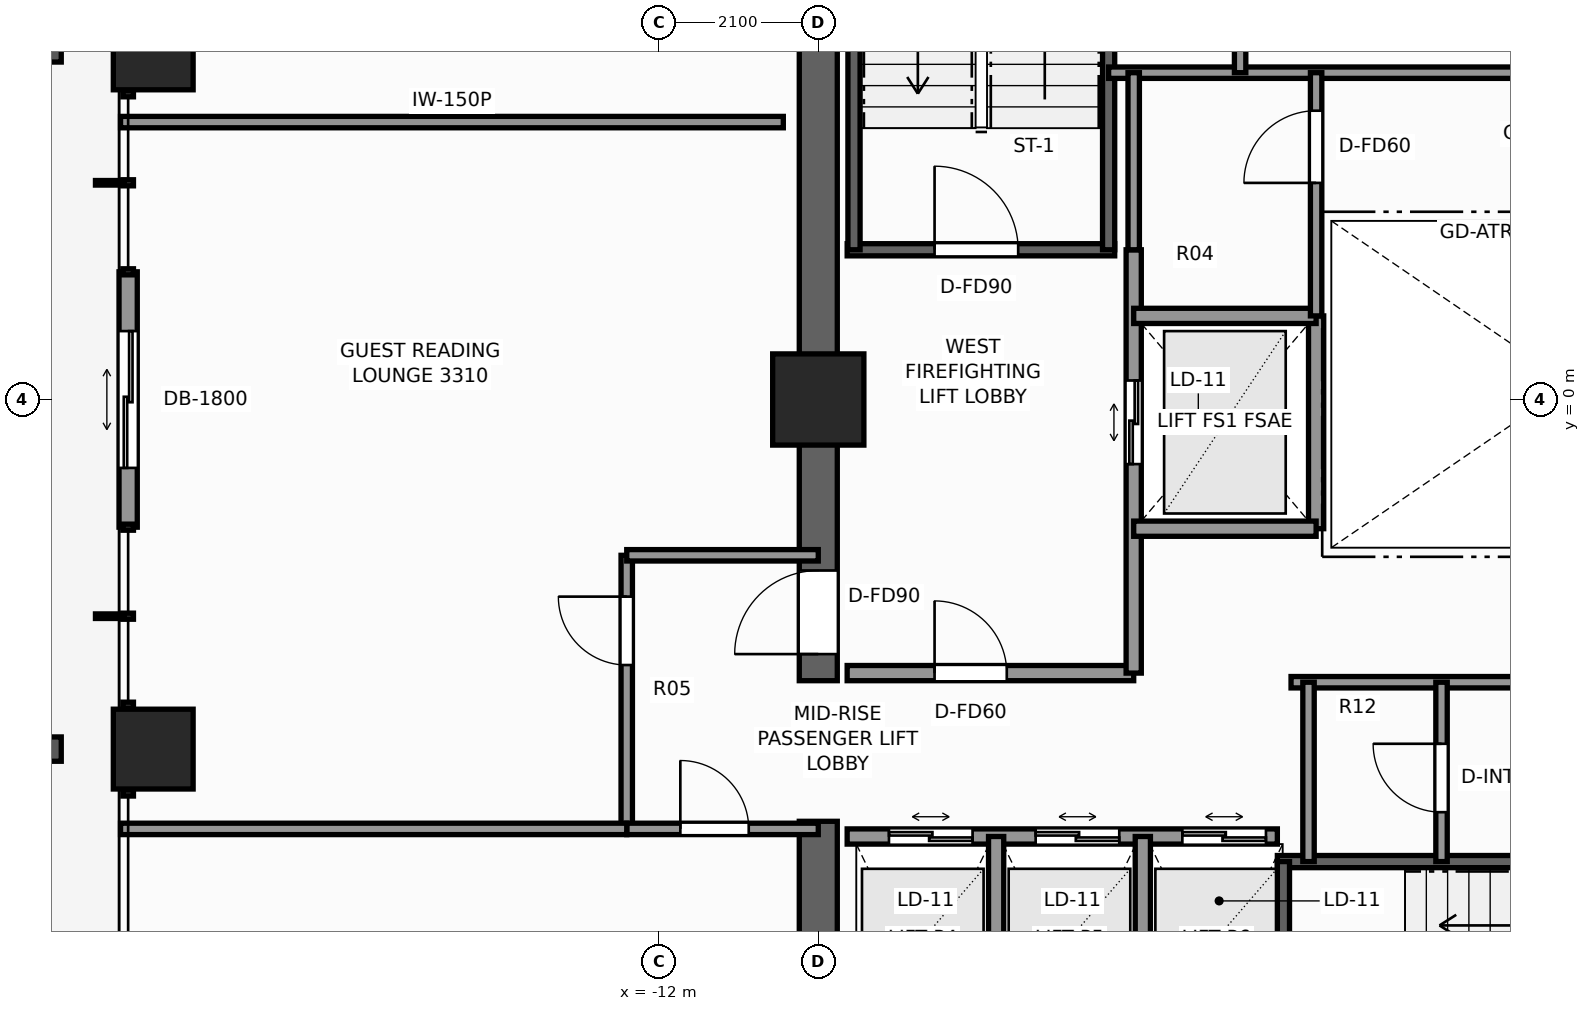
"""IFC4 building model, lengths in metres.
Left out: names, types, materials, properties, quantities, classifications, styles, units other than length and angle.
Written with IfcOpenShell. Run it as: python <this file> out.ifc"""

import sys

from ifc_helpers import new_model, si_unit, direction, frame, frame_2d, origin, origin_2d, place, context, subcontext, project, spatial, rectangle, extrude, element, fill, save


model = new_model("IFC4")
c1 = context("Model", 3, precision=1e-05, world=origin(), true_north=direction((0.0, 1.0)))
c2 = subcontext(c1, "Body", "Model", "MODEL_VIEW")
j1 = project(units=[si_unit("LENGTHUNIT", "METRE"), si_unit("PLANEANGLEUNIT", "RADIAN")], contexts=[c1])
p1 = place(None, origin())
s1 = spatial("IfcSite", under=j1, at=p1, CompositionType="ELEMENT")
p2 = place(p1, origin())
s2 = spatial("IfcBuilding", under=s1, at=p2, CompositionType="ELEMENT")
p3 = place(p2, frame((0.0, 0.0, 115.1)))
s3 = spatial("IfcBuildingStorey", under=s2, at=p3, CompositionType="ELEMENT", Elevation=115.1)
p4 = place(p3, frame((-9.9, -9.65, 0.0), z_axis=(0.0, 0.0, 1.0), x_axis=(0.0, 1.0, 0.0)))
e1 = element("IfcWall", 1, at=p4, inside=s3, PredefinedType="SHEAR", context=c2, shape_type="SweptSolid", body=[
    extrude(rectangle(XDim=4.1, YDim=0.5, at=frame_2d((2.05, 0.0))), origin(), (0.0, 0.0, 1.0), 3.3),
])
p5 = place(p3, frame((-9.9, -3.7, 0.0), z_axis=(0.0, 0.0, 1.0), x_axis=(0.0, 1.0, 0.0)))
e2 = element("IfcWall", 2, at=p5, inside=s3, PredefinedType="SHEAR", context=c2, shape_type="SweptSolid", body=[
    extrude(rectangle(XDim=13.35, YDim=0.5, at=frame_2d((6.675, 0.0))), origin(), (0.0, 0.0, 1.0), 3.3),
])
p6 = place(p5, frame((0.35, 0.0, 0.0)))
e3 = element("IfcOpeningElement", 3, at=p6, cuts=e2, PredefinedType="OPENING", context=c2, shape_type="SweptSolid", body=[
    extrude(rectangle(XDim=1.1, YDim=2.2, at=frame_2d((0.55, 1.1))), frame((0.0, 0.26, 0.0), z_axis=(0.0, -1.0, 0.0), x_axis=(1.0, 0.0, 0.0)), (0.0, 0.0, 1.0), 0.52),
])
p7 = place(p3, frame((-9.9, 0.0, 0.0), z_axis=(0.0, 0.0, 1.0), x_axis=(1.0, 0.0, 0.0)))
e4 = element("IfcColumn", 4, at=p7, inside=s3, PredefinedType="COLUMN", context=c2, shape_type="SweptSolid", body=[
    extrude(rectangle(XDim=1.2, YDim=1.2, at=origin_2d()), origin(), (0.0, 0.0, 1.0), 3.3),
])
for number, where, z_axis, x_axis in (
    (5, (-18.65, -4.6, 0.0), (0.0, 0.0, 1.0), (1.0, 0.0, 0.0)),
    (6, (-18.65, 4.6, 0.0), (0.0, 0.0, 1.0), (1.0, 0.0, 0.0)),
):
    element("IfcColumn", number, at=place(p3, frame(where, z_axis=z_axis, x_axis=x_axis)), inside=s3, PredefinedType="COLUMN", context=c2, shape_type="SweptSolid", body=[
        extrude(rectangle(XDim=1.05, YDim=1.05, at=origin_2d()), origin(), (0.0, 0.0, 1.0), 3.3),
    ])
p8 = place(p3, frame((-18.98, -1.68, 0.0), z_axis=(0.0, 0.0, 1.0), x_axis=(0.0, 1.0, 0.0)))
e7 = element("IfcWall", 7, at=p8, inside=s3, PredefinedType="STANDARD", context=c2, shape_type="SweptSolid", body=[
    extrude(rectangle(XDim=3.36, YDim=0.24, at=frame_2d((1.68, 0.0))), origin(), (0.0, 0.0, 1.0), 3.08),
])
p9 = place(p8, frame((0.78, 0.0, 0.0)))
e8 = element("IfcOpeningElement", 8, at=p9, cuts=e7, PredefinedType="OPENING", context=c2, shape_type="SweptSolid", body=[
    extrude(rectangle(XDim=1.8, YDim=2.2, at=frame_2d((0.9, 1.1))), frame((0.0, 0.13, 0.0), z_axis=(0.0, -1.0, 0.0), x_axis=(1.0, 0.0, 0.0)), (0.0, 0.0, 1.0), 0.26),
])
p10 = place(p3, frame((-9.52, 1.97, 0.0), z_axis=(0.0, 0.0, 1.0), x_axis=(1.0, 0.0, 0.0)))
e9 = element("IfcWall", 9, at=p10, inside=s3, PredefinedType="SHEAR", context=c2, shape_type="SweptSolid", body=[
    extrude(rectangle(XDim=3.52, YDim=0.16, at=frame_2d((1.76, 0.0))), origin(), (0.0, 0.0, 1.0), 3.3),
])
p11 = place(p10, frame((1.15, 0.0, 0.0)))
e10 = element("IfcOpeningElement", 10, at=p11, cuts=e9, PredefinedType="OPENING", context=c2, shape_type="SweptSolid", body=[
    extrude(rectangle(XDim=1.1, YDim=2.2, at=frame_2d((0.55, 1.1))), frame((0.0, 0.09, 0.0), z_axis=(0.0, -1.0, 0.0), x_axis=(1.0, 0.0, 0.0)), (0.0, 0.0, 1.0), 0.18),
])
for number, where, z_axis, x_axis in (
    (11, (-9.43, 1.97, 0.0), (0.0, 0.0, 1.0), (0.0, 1.0, 0.0)),
    (12, (-6.08, 1.97, 0.0), (0.0, 0.0, 1.0), (0.0, 1.0, 0.0)),
):
    element("IfcWall", number, at=place(p3, frame(where, z_axis=z_axis, x_axis=x_axis)), inside=s3, PredefinedType="SHEAR", context=c2, shape_type="SweptSolid", body=[
        extrude(rectangle(XDim=7.56, YDim=0.16, at=frame_2d((3.78, 0.0))), origin(), (0.0, 0.0, 1.0), 3.3),
    ])
p12 = place(p3, frame((-3.86, -6.08, 0.0), z_axis=(0.0, 0.0, 1.0), x_axis=(1.0, 0.0, 0.0)))
e13 = element("IfcWall", 13, at=p12, inside=s3, PredefinedType="SHEAR", context=c2, shape_type="SweptSolid", body=[
    extrude(rectangle(XDim=7.72, YDim=0.16, at=frame_2d((3.86, 0.0))), origin(), (0.0, 0.0, 1.0), 3.3),
])
p13 = place(p3, frame((-3.78, -9.43, 0.0), z_axis=(0.0, 0.0, 1.0), x_axis=(0.0, 1.0, 0.0)))
e14 = element("IfcWall", 14, at=p13, inside=s3, PredefinedType="SHEAR", context=c2, shape_type="SweptSolid", body=[
    extrude(rectangle(XDim=3.35, YDim=0.16, at=frame_2d((1.675, 0.0))), origin(), (0.0, 0.0, 1.0), 3.3),
])
p14 = place(p3, frame((-9.52, -3.6, 0.0), z_axis=(0.0, 0.0, 1.0), x_axis=(1.0, 0.0, 0.0)))
e15 = element("IfcWall", 15, at=p14, inside=s3, PredefinedType="SOLIDWALL", context=c2, shape_type="SweptSolid", body=[
    extrude(rectangle(XDim=3.77, YDim=0.2, at=frame_2d((1.885, 0.0))), origin(), (0.0, 0.0, 1.0), 3.08),
])
p15 = place(p14, frame((1.15, 0.0, 0.0)))
e16 = element("IfcOpeningElement", 16, at=p15, cuts=e15, PredefinedType="OPENING", context=c2, shape_type="SweptSolid", body=[
    extrude(rectangle(XDim=0.95, YDim=2.06, at=frame_2d((0.475, 1.03))), frame((0.0, 0.11, 0.0), z_axis=(0.0, -1.0, 0.0), x_axis=(1.0, 0.0, 0.0)), (0.0, 0.0, 1.0), 0.22),
])
p16 = place(p3, frame((-5.75, -3.6, 0.0), z_axis=(0.0, 0.0, 1.0), x_axis=(0.0, 1.0, 0.0)))
e17 = element("IfcWall", 17, at=p16, inside=s3, PredefinedType="SOLIDWALL", context=c2, shape_type="SweptSolid", body=[
    extrude(rectangle(XDim=5.57, YDim=0.2, at=frame_2d((2.785, 0.0))), origin(), (0.0, 0.0, 1.0), 2.715),
])
p17 = place(p16, frame((2.75, 0.0, 0.0)))
e18 = element("IfcOpeningElement", 18, at=p17, cuts=e17, PredefinedType="OPENING", context=c2, shape_type="SweptSolid", body=[
    extrude(rectangle(XDim=1.1, YDim=2.2, at=frame_2d((0.55, 1.1))), frame((0.0, 0.11, 0.0), z_axis=(0.0, -1.0, 0.0), x_axis=(1.0, 0.0, 0.0)), (0.0, 0.0, 1.0), 0.22),
])
p18 = place(p3, frame((-3.35, -1.7, 0.0), z_axis=(0.0, 0.0, 1.0), x_axis=(0.0, 1.0, 0.0)))
e19 = element("IfcWall", 19, at=p18, inside=s3, PredefinedType="SOLIDWALL", context=c2, shape_type="SweptSolid", body=[
    extrude(rectangle(XDim=2.8, YDim=0.2, at=frame_2d((1.4, 0.0))), origin(), (0.0, 0.0, 1.0), 2.715),
])
for number, where, z_axis, x_axis in (
    (20, (-5.75, -1.7, 0.0), (0.0, 0.0, 1.0), (1.0, 0.0, 0.0)),
    (21, (-5.75, 1.1, 0.0), (0.0, 0.0, 1.0), (1.0, 0.0, 0.0)),
):
    element("IfcWall", number, at=place(p3, frame(where, z_axis=z_axis, x_axis=x_axis)), inside=s3, PredefinedType="SOLIDWALL", context=c2, shape_type="SweptSolid", body=[
        extrude(rectangle(XDim=2.4, YDim=0.2, at=frame_2d((1.2, 0.0))), origin(), (0.0, 0.0, 1.0), 3.08),
    ])
p19 = place(p3, frame((-6.08, 4.3, 0.0), z_axis=(0.0, 0.0, 1.0), x_axis=(1.0, 0.0, 0.0)))
e22 = element("IfcWall", 22, at=p19, inside=s3, PredefinedType="PARTITIONING", context=c2, shape_type="SweptSolid", body=[
    extrude(rectangle(XDim=6.3, YDim=0.15, at=frame_2d((3.15, 0.0))), origin(), (0.0, 0.0, 1.0), 3.08),
])
p20 = place(p3, frame((-4.35, 4.3, 0.0), z_axis=(0.0, 0.0, 1.0), x_axis=(0.0, 1.0, 0.0)))
e23 = element("IfcWall", 23, at=p20, inside=s3, PredefinedType="PARTITIONING", context=c2, shape_type="SweptSolid", body=[
    extrude(rectangle(XDim=5.22, YDim=0.15, at=frame_2d((2.61, 0.0))), origin(), (0.0, 0.0, 1.0), 3.08),
])
p21 = place(p20, frame((0.85, 0.0, 0.0)))
e24 = element("IfcOpeningElement", 24, at=p21, cuts=e23, PredefinedType="OPENING", context=c2, shape_type="SweptSolid", body=[
    extrude(rectangle(XDim=0.85, YDim=2.03, at=frame_2d((0.425, 1.015))), frame((0.0, 0.085, 0.0), z_axis=(0.0, -1.0, 0.0), x_axis=(1.0, 0.0, 0.0)), (0.0, 0.0, 1.0), 0.17),
])
p22 = place(p3, frame((-9.52, -5.75, 0.0), z_axis=(0.0, 0.0, 1.0), x_axis=(1.0, 0.0, 0.0)))
e25 = element("IfcWall", 25, at=p22, inside=s3, PredefinedType="SOLIDWALL", context=c2, shape_type="SweptSolid", body=[
    extrude(rectangle(XDim=5.66, YDim=0.2, at=frame_2d((2.83, 0.0))), origin(), (0.0, 0.0, 1.0), 3.08),
])
p23 = place(p22, frame((0.55, 0.0, 0.0)))
e26 = element("IfcOpeningElement", 26, at=p23, cuts=e25, PredefinedType="OPENING", context=c2, shape_type="SweptSolid", body=[
    extrude(rectangle(XDim=1.1, YDim=2.2, at=frame_2d((0.55, 1.1))), frame((0.0, 0.11, 0.0), z_axis=(0.0, -1.0, 0.0), x_axis=(1.0, 0.0, 0.0)), (0.0, 0.0, 1.0), 0.22),
])
p24 = place(p22, frame((2.48, 0.0, 0.0)))
e27 = element("IfcOpeningElement", 27, at=p24, cuts=e25, PredefinedType="OPENING", context=c2, shape_type="SweptSolid", body=[
    extrude(rectangle(XDim=1.1, YDim=2.2, at=frame_2d((0.55, 1.1))), frame((0.0, 0.11, 0.0), z_axis=(0.0, -1.0, 0.0), x_axis=(1.0, 0.0, 0.0)), (0.0, 0.0, 1.0), 0.22),
])
p25 = place(p22, frame((4.41, 0.0, 0.0)))
e28 = element("IfcOpeningElement", 28, at=p25, cuts=e25, PredefinedType="OPENING", context=c2, shape_type="SweptSolid", body=[
    extrude(rectangle(XDim=1.1, YDim=2.2, at=frame_2d((0.55, 1.1))), frame((0.0, 0.11, 0.0), z_axis=(0.0, -1.0, 0.0), x_axis=(1.0, 0.0, 0.0)), (0.0, 0.0, 1.0), 0.22),
])
for number, where, z_axis, x_axis in (
    (29, (-7.56, -9.52, 0.0), (0.0, 0.0, 1.0), (0.0, 1.0, 0.0)),
    (30, (-5.63, -9.52, 0.0), (0.0, 0.0, 1.0), (0.0, 1.0, 0.0)),
):
    element("IfcWall", number, at=place(p3, frame(where, z_axis=z_axis, x_axis=x_axis)), inside=s3, PredefinedType="SOLIDWALL", context=c2, shape_type="SweptSolid", body=[
        extrude(rectangle(XDim=3.77, YDim=0.2, at=frame_2d((1.885, 0.0))), origin(), (0.0, 0.0, 1.0), 3.08),
    ])
p26 = place(p3, frame((-3.68, -3.72, 0.0), z_axis=(0.0, 0.0, 1.0), x_axis=(1.0, 0.0, 0.0)))
e31 = element("IfcWall", 31, at=p26, inside=s3, PredefinedType="PARTITIONING", context=c2, shape_type="SweptSolid", body=[
    extrude(rectangle(XDim=7.36, YDim=0.15, at=frame_2d((3.68, 0.0))), origin(), (0.0, 0.0, 1.0), 3.08),
])
p27 = place(p3, frame((-3.45, -6.08, 0.0), z_axis=(0.0, 0.0, 1.0), x_axis=(0.0, 1.0, 0.0)))
e32 = element("IfcWall", 32, at=p27, inside=s3, PredefinedType="PARTITIONING", context=c2, shape_type="SweptSolid", body=[
    extrude(rectangle(XDim=2.36, YDim=0.15, at=frame_2d((1.18, 0.0))), origin(), (0.0, 0.0, 1.0), 3.08),
])
p28 = place(p3, frame((-1.7, -6.08, 0.0), z_axis=(0.0, 0.0, 1.0), x_axis=(0.0, 1.0, 0.0)))
e33 = element("IfcWall", 33, at=p28, inside=s3, PredefinedType="PARTITIONING", context=c2, shape_type="SweptSolid", body=[
    extrude(rectangle(XDim=2.36, YDim=0.15, at=frame_2d((1.18, 0.0))), origin(), (0.0, 0.0, 1.0), 3.08),
])
p29 = place(p28, frame((0.65, 0.0, 0.0)))
e34 = element("IfcOpeningElement", 34, at=p29, cuts=e33, PredefinedType="OPENING", context=c2, shape_type="SweptSolid", body=[
    extrude(rectangle(XDim=0.9, YDim=2.06, at=frame_2d((0.45, 1.03))), frame((0.0, 0.085, 0.0), z_axis=(0.0, -1.0, 0.0), x_axis=(1.0, 0.0, 0.0)), (0.0, 0.0, 1.0), 0.17),
])
p30 = place(p3, frame((-3.35, 1.1, 0.0), z_axis=(0.0, 0.0, 1.0), x_axis=(0.0, 1.0, 0.0)))
e35 = element("IfcWall", 35, at=p30, inside=s3, PredefinedType="PARTITIONING", context=c2, shape_type="SweptSolid", body=[
    extrude(rectangle(XDim=3.2, YDim=0.15, at=frame_2d((1.6, 0.0))), origin(), (0.0, 0.0, 1.0), 2.715),
])
p31 = place(p30, frame((1.75, 0.0, 0.0)))
e36 = element("IfcOpeningElement", 36, at=p31, cuts=e35, PredefinedType="OPENING", context=c2, shape_type="SweptSolid", body=[
    extrude(rectangle(XDim=0.95, YDim=2.06, at=frame_2d((0.475, 1.03))), frame((0.0, 0.085, 0.0), z_axis=(0.0, -1.0, 0.0), x_axis=(1.0, 0.0, 0.0)), (0.0, 0.0, 1.0), 0.17),
])
p32 = place(p3, frame((-5.75, 1.97, 0.0), z_axis=(0.0, 0.0, 1.0), x_axis=(0.0, 1.0, 0.0)))
e37 = element("IfcWall", 37, at=p32, inside=s3, PredefinedType="PARTITIONING", context=c2, shape_type="SweptSolid", body=[
    extrude(rectangle(XDim=2.33, YDim=0.15, at=frame_2d((1.165, 0.0))), origin(), (0.0, 0.0, 1.0), 2.715),
])
p33 = place(p3, frame((-12.42, -5.65, 0.0), z_axis=(0.0, 0.0, 1.0), x_axis=(0.0, 1.0, 0.0)))
e38 = element("IfcWall", 38, at=p33, inside=s3, PredefinedType="PARTITIONING", context=c2, shape_type="SweptSolid", body=[
    extrude(rectangle(XDim=3.6, YDim=0.15, at=frame_2d((1.8, 0.0))), origin(), (0.0, 0.0, 1.0), 2.292),
])
p34 = place(p33, frame((2.156, 0.0, 0.0)))
e39 = element("IfcOpeningElement", 39, at=p34, cuts=e38, PredefinedType="OPENING", context=c2, shape_type="SweptSolid", body=[
    extrude(rectangle(XDim=0.9, YDim=2.06, at=frame_2d((0.45, 1.03))), frame((0.0, 0.085, 0.0), z_axis=(0.0, -1.0, 0.0), x_axis=(1.0, 0.0, 0.0)), (0.0, 0.0, 1.0), 0.17),
])
p35 = place(p3, frame((-12.42, -2.05, 0.0), z_axis=(0.0, 0.0, 1.0), x_axis=(1.0, 0.0, 0.0)))
e40 = element("IfcWall", 40, at=p35, inside=s3, PredefinedType="PARTITIONING", context=c2, shape_type="SweptSolid", body=[
    extrude(rectangle(XDim=2.52, YDim=0.15, at=frame_2d((1.26, 0.0))), origin(), (0.0, 0.0, 1.0), 3.08),
])
p36 = place(p3, frame((-12.42, -5.65, 0.0), z_axis=(0.0, 0.0, 1.0), x_axis=(1.0, 0.0, 0.0)))
e41 = element("IfcWall", 41, at=p36, inside=s3, PredefinedType="PARTITIONING", context=c2, shape_type="SweptSolid", body=[
    extrude(rectangle(XDim=2.52, YDim=0.15, at=frame_2d((1.26, 0.0))), origin(), (0.0, 0.0, 1.0), 3.08),
])
p37 = place(p36, frame((0.705, 0.0, 0.0)))
e42 = element("IfcOpeningElement", 42, at=p37, cuts=e41, PredefinedType="OPENING", context=c2, shape_type="SweptSolid", body=[
    extrude(rectangle(XDim=0.9, YDim=2.06, at=frame_2d((0.45, 1.03))), frame((0.0, 0.085, 0.0), z_axis=(0.0, -1.0, 0.0), x_axis=(1.0, 0.0, 0.0)), (0.0, 0.0, 1.0), 0.17),
])
p38 = place(p3, frame((-19.08, 3.65, 0.0), z_axis=(0.0, 0.0, 1.0), x_axis=(1.0, 0.0, 0.0)))
e43 = element("IfcWall", 43, at=p38, inside=s3, PredefinedType="PARTITIONING", context=c2, shape_type="SweptSolid", body=[
    extrude(rectangle(XDim=8.72, YDim=0.15, at=frame_2d((4.36, 0.0))), origin(), (0.0, 0.0, 1.0), 2.449),
])
p39 = place(p3, frame((-19.08, -5.65, 0.0), z_axis=(0.0, 0.0, 1.0), x_axis=(1.0, 0.0, 0.0)))
e44 = element("IfcWall", 44, at=p39, inside=s3, PredefinedType="PARTITIONING", context=c2, shape_type="SweptSolid", body=[
    extrude(rectangle(XDim=6.66, YDim=0.15, at=frame_2d((3.33, 0.0))), origin(), (0.0, 0.0, 1.0), 2.449),
])
p40 = place(p9, origin())
e45 = element("IfcDoor", 45, at=p40, inside=s3, OperationType="DOUBLE_DOOR_SLIDING", PredefinedType="DOOR", context=c2, shape_type="SweptSolid", body=[
    extrude(rectangle(XDim=1.8, YDim=2.2, at=frame_2d((0.9, 1.1))), frame((0.0, 0.025, 0.0), z_axis=(0.0, -1.0, 0.0), x_axis=(1.0, 0.0, 0.0)), (0.0, 0.0, 1.0), 0.05),
])
fill(e8, e45)
p41 = place(p11, origin())
e46 = element("IfcDoor", 46, at=p41, inside=s3, OperationType="SINGLE_SWING_LEFT", PredefinedType="DOOR", context=c2, shape_type="SweptSolid", body=[
    extrude(rectangle(XDim=1.1, YDim=2.2, at=frame_2d((0.55, 1.1))), frame((0.0, 0.025, 0.0), z_axis=(0.0, -1.0, 0.0), x_axis=(1.0, 0.0, 0.0)), (0.0, 0.0, 1.0), 0.05),
])
fill(e10, e46)
p42 = place(p6, origin())
e47 = element("IfcDoor", 47, at=p42, inside=s3, OperationType="SINGLE_SWING_LEFT", PredefinedType="DOOR", context=c2, shape_type="SweptSolid", body=[
    extrude(rectangle(XDim=1.1, YDim=2.2, at=frame_2d((0.55, 1.1))), frame((0.0, 0.025, 0.0), z_axis=(0.0, -1.0, 0.0), x_axis=(1.0, 0.0, 0.0)), (0.0, 0.0, 1.0), 0.05),
])
fill(e3, e47)
p43 = place(p17, origin())
e48 = element("IfcDoor", 48, at=p43, inside=s3, OperationType="DOUBLE_DOOR_SLIDING", PredefinedType="DOOR", context=c2, shape_type="SweptSolid", body=[
    extrude(rectangle(XDim=1.1, YDim=2.2, at=frame_2d((0.55, 1.1))), frame((0.0, 0.025, 0.0), z_axis=(0.0, -1.0, 0.0), x_axis=(1.0, 0.0, 0.0)), (0.0, 0.0, 1.0), 0.05),
])
fill(e18, e48)
p44 = place(p23, origin())
e49 = element("IfcDoor", 49, at=p44, inside=s3, OperationType="DOUBLE_DOOR_SLIDING", PredefinedType="DOOR", context=c2, shape_type="SweptSolid", body=[
    extrude(rectangle(XDim=1.1, YDim=2.2, at=frame_2d((0.55, 1.1))), frame((0.0, 0.025, 0.0), z_axis=(0.0, -1.0, 0.0), x_axis=(1.0, 0.0, 0.0)), (0.0, 0.0, 1.0), 0.05),
])
fill(e26, e49)
p45 = place(p24, origin())
e50 = element("IfcDoor", 50, at=p45, inside=s3, OperationType="DOUBLE_DOOR_SLIDING", PredefinedType="DOOR", context=c2, shape_type="SweptSolid", body=[
    extrude(rectangle(XDim=1.1, YDim=2.2, at=frame_2d((0.55, 1.1))), frame((0.0, 0.025, 0.0), z_axis=(0.0, -1.0, 0.0), x_axis=(1.0, 0.0, 0.0)), (0.0, 0.0, 1.0), 0.05),
])
fill(e27, e50)
p46 = place(p25, origin())
e51 = element("IfcDoor", 51, at=p46, inside=s3, OperationType="DOUBLE_DOOR_SLIDING", PredefinedType="DOOR", context=c2, shape_type="SweptSolid", body=[
    extrude(rectangle(XDim=1.1, YDim=2.2, at=frame_2d((0.55, 1.1))), frame((0.0, 0.025, 0.0), z_axis=(0.0, -1.0, 0.0), x_axis=(1.0, 0.0, 0.0)), (0.0, 0.0, 1.0), 0.05),
])
fill(e28, e51)
p47 = place(p15, origin())
e52 = element("IfcDoor", 52, at=p47, inside=s3, OperationType="SINGLE_SWING_LEFT", PredefinedType="DOOR", context=c2, shape_type="SweptSolid", body=[
    extrude(rectangle(XDim=0.95, YDim=2.06, at=frame_2d((0.475, 1.03))), frame((0.0, 0.025, 0.0), z_axis=(0.0, -1.0, 0.0), x_axis=(1.0, 0.0, 0.0)), (0.0, 0.0, 1.0), 0.05),
])
fill(e16, e52)
p48 = place(p29, origin())
e53 = element("IfcDoor", 53, at=p48, inside=s3, OperationType="SINGLE_SWING_RIGHT", PredefinedType="DOOR", context=c2, shape_type="SweptSolid", body=[
    extrude(rectangle(XDim=0.9, YDim=2.06, at=frame_2d((0.45, 1.03))), frame((0.0, 0.025, 0.0), z_axis=(0.0, -1.0, 0.0), x_axis=(1.0, 0.0, 0.0)), (0.0, 0.0, 1.0), 0.05),
])
fill(e34, e53)
p49 = place(p31, origin())
e54 = element("IfcDoor", 54, at=p49, inside=s3, OperationType="SINGLE_SWING_LEFT", PredefinedType="DOOR", context=c2, shape_type="SweptSolid", body=[
    extrude(rectangle(XDim=0.95, YDim=2.06, at=frame_2d((0.475, 1.03))), frame((0.0, 0.025, 0.0), z_axis=(0.0, -1.0, 0.0), x_axis=(1.0, 0.0, 0.0)), (0.0, 0.0, 1.0), 0.05),
])
fill(e36, e54)
p50 = place(p34, origin())
e55 = element("IfcDoor", 55, at=p50, inside=s3, OperationType="SINGLE_SWING_RIGHT", PredefinedType="DOOR", context=c2, shape_type="SweptSolid", body=[
    extrude(rectangle(XDim=0.9, YDim=2.06, at=frame_2d((0.45, 1.03))), frame((0.0, 0.025, 0.0), z_axis=(0.0, -1.0, 0.0), x_axis=(1.0, 0.0, 0.0)), (0.0, 0.0, 1.0), 0.05),
])
fill(e39, e55)
p51 = place(p37, origin())
e56 = element("IfcDoor", 56, at=p51, inside=s3, OperationType="SINGLE_SWING_LEFT", PredefinedType="DOOR", context=c2, shape_type="SweptSolid", body=[
    extrude(rectangle(XDim=0.9, YDim=2.06, at=frame_2d((0.45, 1.03))), frame((0.0, 0.025, 0.0), z_axis=(0.0, -1.0, 0.0), x_axis=(1.0, 0.0, 0.0)), (0.0, 0.0, 1.0), 0.05),
])
fill(e42, e56)
save(model, sys.argv[1])
